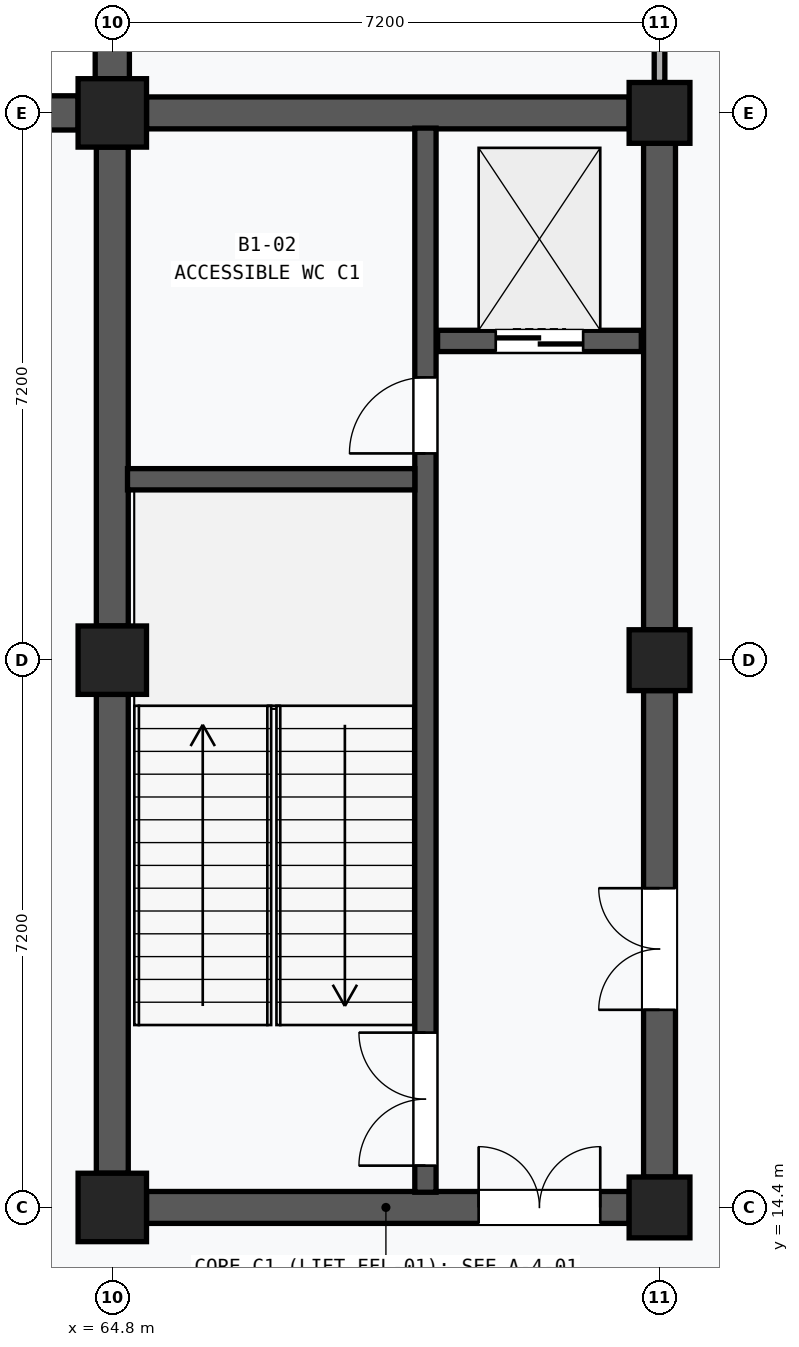
"""IFC4 building model, lengths in metres.
Left out: names, types, materials, properties, quantities, classifications, styles, units other than length and angle.
Written with IfcOpenShell. Run it as: python <this file> out.ifc"""

import sys

from ifc_helpers import new_model, si_unit, direction, frame, frame_2d, origin, origin_2d, place, context, subcontext, project, spatial, rectangle, extrude, element, fill, save


model = new_model("IFC4")
c1 = context("Model", 3, precision=1e-05, world=origin(), true_north=direction((0.0, 1.0)))
c2 = subcontext(c1, "Body", "Model", "MODEL_VIEW")
j1 = project(units=[si_unit("LENGTHUNIT", "METRE"), si_unit("PLANEANGLEUNIT", "RADIAN")], contexts=[c1])
p1 = place(None, origin())
s1 = spatial("IfcSite", under=j1, at=p1, CompositionType="ELEMENT")
p2 = place(p1, origin())
s2 = spatial("IfcBuilding", under=s1, at=p2, CompositionType="ELEMENT")
p3 = place(p2, frame((0.0, 0.0, -4.5)))
s3 = spatial("IfcBuildingStorey", under=s2, at=p3, CompositionType="ELEMENT", Elevation=-4.5)
for number, where, z_axis, x_axis in (
    (1, (64.8, 14.4, 0.0), (0.0, 0.0, 1.0), (1.0, 0.0, 0.0)),
    (2, (64.8, 21.6, 0.0), (0.0, 0.0, 1.0), (1.0, 0.0, 0.0)),
    (3, (64.8, 28.8, 0.0), (0.0, 0.0, 1.0), (1.0, 0.0, 0.0)),
):
    element("IfcColumn", number, at=place(p3, frame(where, z_axis=z_axis, x_axis=x_axis)), inside=s3, PredefinedType="COLUMN", context=c2, shape_type="SweptSolid", body=[
        extrude(rectangle(XDim=0.9, YDim=0.9, at=origin_2d()), origin(), (0.0, 0.0, 1.0), 4.5),
    ])
for number, where, z_axis, x_axis in (
    (4, (72.0, 14.4, 0.0), (0.0, 0.0, 1.0), (1.0, 0.0, 0.0)),
    (5, (72.0, 21.6, 0.0), (0.0, 0.0, 1.0), (1.0, 0.0, 0.0)),
    (6, (72.0, 28.8, 0.0), (0.0, 0.0, 1.0), (1.0, 0.0, 0.0)),
):
    element("IfcColumn", number, at=place(p3, frame(where, z_axis=z_axis, x_axis=x_axis)), inside=s3, PredefinedType="COLUMN", context=c2, shape_type="SweptSolid", body=[
        extrude(rectangle(XDim=0.8, YDim=0.8, at=origin_2d()), origin(), (0.0, 0.0, 1.0), 4.5),
    ])
p4 = place(p3, frame((58.0, 28.8, 0.0), z_axis=(0.0, 0.0, 1.0), x_axis=(1.0, 0.0, 0.0)))
e7 = element("IfcWall", 7, at=p4, inside=s3, PredefinedType="SOLIDWALL", context=c2, shape_type="SweptSolid", body=[
    extrude(rectangle(XDim=6.35, YDim=0.45, at=frame_2d((3.175, 0.0))), origin(), (0.0, 0.0, 1.0), 3.57),
])
p5 = place(p3, frame((64.8, 29.25, 0.0), z_axis=(0.0, 0.0, 1.0), x_axis=(0.0, 1.0, 0.0)))
e8 = element("IfcWall", 8, at=p5, inside=s3, PredefinedType="SOLIDWALL", context=c2, shape_type="SweptSolid", body=[
    extrude(rectangle(XDim=6.3, YDim=0.45, at=frame_2d((3.15, 0.0))), origin(), (0.0, 0.0, 1.0), 3.57),
])
p6 = place(p3, frame((64.8, 14.85, 0.0), z_axis=(0.0, 0.0, 1.0), x_axis=(0.0, 1.0, 0.0)))
e9 = element("IfcWall", 9, at=p6, inside=s3, PredefinedType="SHEAR", context=c2, shape_type="SweptSolid", body=[
    extrude(rectangle(XDim=6.3, YDim=0.42, at=frame_2d((3.15, 0.0))), origin(), (0.0, 0.0, 1.0), 3.3),
])
p7 = place(p3, frame((64.8, 22.05, 0.0), z_axis=(0.0, 0.0, 1.0), x_axis=(0.0, 1.0, 0.0)))
e10 = element("IfcWall", 10, at=p7, inside=s3, PredefinedType="SHEAR", context=c2, shape_type="SweptSolid", body=[
    extrude(rectangle(XDim=6.3, YDim=0.42, at=frame_2d((3.15, 0.0))), origin(), (0.0, 0.0, 1.0), 3.3),
])
p8 = place(p3, frame((72.0, 14.8, 0.0), z_axis=(0.0, 0.0, 1.0), x_axis=(0.0, 1.0, 0.0)))
e11 = element("IfcWall", 11, at=p8, inside=s3, PredefinedType="SHEAR", context=c2, shape_type="SweptSolid", body=[
    extrude(rectangle(XDim=6.4, YDim=0.42, at=frame_2d((3.2, 0.0))), origin(), (0.0, 0.0, 1.0), 3.3),
])
p9 = place(p8, frame((2.2, 0.0, 0.0)))
e12 = element("IfcOpeningElement", 12, at=p9, cuts=e11, PredefinedType="OPENING", context=c2, shape_type="SweptSolid", body=[
    extrude(rectangle(XDim=1.6, YDim=2.2, at=frame_2d((0.8, 1.1))), frame((0.0, 0.222, 0.0), z_axis=(0.0, -1.0, 0.0), x_axis=(1.0, 0.0, 0.0)), (0.0, 0.0, 1.0), 0.444),
])
p10 = place(p3, frame((72.0, 22.0, 0.0), z_axis=(0.0, 0.0, 1.0), x_axis=(0.0, 1.0, 0.0)))
e13 = element("IfcWall", 13, at=p10, inside=s3, PredefinedType="SHEAR", context=c2, shape_type="SweptSolid", body=[
    extrude(rectangle(XDim=6.4, YDim=0.42, at=frame_2d((3.2, 0.0))), origin(), (0.0, 0.0, 1.0), 3.3),
])
p11 = place(p3, frame((65.25, 14.4, 0.0), z_axis=(0.0, 0.0, 1.0), x_axis=(1.0, 0.0, 0.0)))
e14 = element("IfcWall", 14, at=p11, inside=s3, PredefinedType="SHEAR", context=c2, shape_type="SweptSolid", body=[
    extrude(rectangle(XDim=6.35, YDim=0.42, at=frame_2d((3.175, 0.0))), origin(), (0.0, 0.0, 1.0), 3.3),
])
p12 = place(p11, frame((4.37, 0.0, 0.0)))
e15 = element("IfcOpeningElement", 15, at=p12, cuts=e14, PredefinedType="OPENING", context=c2, shape_type="SweptSolid", body=[
    extrude(rectangle(XDim=1.6, YDim=2.2, at=frame_2d((0.8, 1.1))), frame((0.0, 0.222, 0.0), z_axis=(0.0, -1.0, 0.0), x_axis=(1.0, 0.0, 0.0)), (0.0, 0.0, 1.0), 0.444),
])
p13 = place(p3, frame((65.25, 28.8, 0.0), z_axis=(0.0, 0.0, 1.0), x_axis=(1.0, 0.0, 0.0)))
e16 = element("IfcWall", 16, at=p13, inside=s3, PredefinedType="SHEAR", context=c2, shape_type="SweptSolid", body=[
    extrude(rectangle(XDim=6.35, YDim=0.42, at=frame_2d((3.175, 0.0))), origin(), (0.0, 0.0, 1.0), 3.3),
])
p14 = place(p3, frame((68.92, 14.6, 0.0), z_axis=(0.0, 0.0, 1.0), x_axis=(0.0, 1.0, 0.0)))
e17 = element("IfcWall", 17, at=p14, inside=s3, PredefinedType="SHEAR", context=c2, shape_type="SweptSolid", body=[
    extrude(rectangle(XDim=14.0, YDim=0.28, at=frame_2d((7.0, 0.0))), origin(), (0.0, 0.0, 1.0), 4.2),
])
p15 = place(p14, frame((0.35, 0.0, 0.0)))
e18 = element("IfcOpeningElement", 18, at=p15, cuts=e17, PredefinedType="OPENING", context=c2, shape_type="SweptSolid", body=[
    extrude(rectangle(XDim=1.75, YDim=2.15, at=frame_2d((0.875, 1.075))), frame((0.0, 0.152, 0.0), z_axis=(0.0, -1.0, 0.0), x_axis=(1.0, 0.0, 0.0)), (0.0, 0.0, 1.0), 0.304),
])
p16 = place(p14, frame((9.72, 0.0, 0.0)))
e19 = element("IfcOpeningElement", 19, at=p16, cuts=e17, PredefinedType="OPENING", context=c2, shape_type="SweptSolid", body=[
    extrude(rectangle(XDim=1.0, YDim=2.15, at=frame_2d((0.5, 1.075))), frame((0.0, 0.152, 0.0), z_axis=(0.0, -1.0, 0.0), x_axis=(1.0, 0.0, 0.0)), (0.0, 0.0, 1.0), 0.304),
])
p17 = place(p3, frame((65.0, 23.98, 0.0), z_axis=(0.0, 0.0, 1.0), x_axis=(1.0, 0.0, 0.0)))
e20 = element("IfcWall", 20, at=p17, inside=s3, PredefinedType="SHEAR", context=c2, shape_type="SweptSolid", body=[
    extrude(rectangle(XDim=3.78, YDim=0.28, at=frame_2d((1.89, 0.0))), origin(), (0.0, 0.0, 1.0), 4.2),
])
p18 = place(p3, frame((69.08, 25.8, 0.0), z_axis=(0.0, 0.0, 1.0), x_axis=(1.0, 0.0, 0.0)))
e21 = element("IfcWall", 21, at=p18, inside=s3, PredefinedType="SHEAR", context=c2, shape_type="SweptSolid", body=[
    extrude(rectangle(XDim=2.68, YDim=0.28, at=frame_2d((1.34, 0.0))), origin(), (0.0, 0.0, 1.0), 4.2),
])
p19 = place(p18, frame((0.765, 0.0, 0.0)))
e22 = element("IfcOpeningElement", 22, at=p19, cuts=e21, PredefinedType="OPENING", context=c2, shape_type="SweptSolid", body=[
    extrude(rectangle(XDim=1.15, YDim=2.2, at=frame_2d((0.575, 1.1))), frame((0.0, 0.152, 0.0), z_axis=(0.0, -1.0, 0.0), x_axis=(1.0, 0.0, 0.0)), (0.0, 0.0, 1.0), 0.304),
])
p20 = place(p3, frame((72.0, 29.2, 0.0), z_axis=(0.0, 0.0, 1.0), x_axis=(0.0, 1.0, 0.0)))
e23 = element("IfcWall", 23, at=p20, inside=s3, PredefinedType="PARTITIONING", context=c2, shape_type="SweptSolid", body=[
    extrude(rectangle(XDim=6.4, YDim=0.14, at=frame_2d((3.2, 0.0))), origin(), (0.0, 0.0, 1.0), 3.3),
])
p21 = place(p20, frame((2.69, 0.0, 0.0)))
e24 = element("IfcOpeningElement", 24, at=p21, cuts=e23, PredefinedType="OPENING", context=c2, shape_type="SweptSolid", body=[
    extrude(rectangle(XDim=1.02, YDim=2.12, at=frame_2d((0.51, 1.06))), frame((0.0, 0.082, 0.0), z_axis=(0.0, -1.0, 0.0), x_axis=(1.0, 0.0, 0.0)), (0.0, 0.0, 1.0), 0.164),
])
p22 = place(p9, origin())
e25 = element("IfcDoor", 25, at=p22, inside=s3, OperationType="DOUBLE_DOOR_SINGLE_SWING", PredefinedType="DOOR", context=c2, shape_type="SweptSolid", body=[
    extrude(rectangle(XDim=1.6, YDim=2.2, at=frame_2d((0.8, 1.1))), frame((0.0, 0.025, 0.0), z_axis=(0.0, -1.0, 0.0), x_axis=(1.0, 0.0, 0.0)), (0.0, 0.0, 1.0), 0.05),
])
fill(e12, e25)
p23 = place(p12, origin())
e26 = element("IfcDoor", 26, at=p23, inside=s3, OperationType="DOUBLE_DOOR_SINGLE_SWING", PredefinedType="DOOR", context=c2, shape_type="SweptSolid", body=[
    extrude(rectangle(XDim=1.6, YDim=2.2, at=frame_2d((0.8, 1.1))), frame((0.0, 0.025, 0.0), z_axis=(0.0, -1.0, 0.0), x_axis=(1.0, 0.0, 0.0)), (0.0, 0.0, 1.0), 0.05),
])
fill(e15, e26)
p24 = place(p15, origin())
e27 = element("IfcDoor", 27, at=p24, inside=s3, OperationType="DOUBLE_DOOR_SINGLE_SWING", PredefinedType="DOOR", context=c2, shape_type="SweptSolid", body=[
    extrude(rectangle(XDim=1.75, YDim=2.15, at=frame_2d((0.875, 1.075))), frame((0.0, 0.025, 0.0), z_axis=(0.0, -1.0, 0.0), x_axis=(1.0, 0.0, 0.0)), (0.0, 0.0, 1.0), 0.05),
])
fill(e18, e27)
p25 = place(p16, origin())
e28 = element("IfcDoor", 28, at=p25, inside=s3, OperationType="SINGLE_SWING_LEFT", PredefinedType="DOOR", context=c2, shape_type="SweptSolid", body=[
    extrude(rectangle(XDim=1.0, YDim=2.15, at=frame_2d((0.5, 1.075))), frame((0.0, 0.025, 0.0), z_axis=(0.0, -1.0, 0.0), x_axis=(1.0, 0.0, 0.0)), (0.0, 0.0, 1.0), 0.05),
])
fill(e19, e28)
p26 = place(p19, frame((1.15, 0.0, 0.0), z_axis=(0.0, 0.0, 1.0), x_axis=(-1.0, 0.0, 0.0)))
e29 = element("IfcDoor", 29, at=p26, inside=s3, OperationType="DOUBLE_DOOR_SLIDING", PredefinedType="DOOR", context=c2, shape_type="SweptSolid", body=[
    extrude(rectangle(XDim=1.15, YDim=2.2, at=frame_2d((0.575, 1.1))), frame((0.0, 0.025, 0.0), z_axis=(0.0, -1.0, 0.0), x_axis=(1.0, 0.0, 0.0)), (0.0, 0.0, 1.0), 0.05),
])
fill(e22, e29)
save(model, sys.argv[1])
